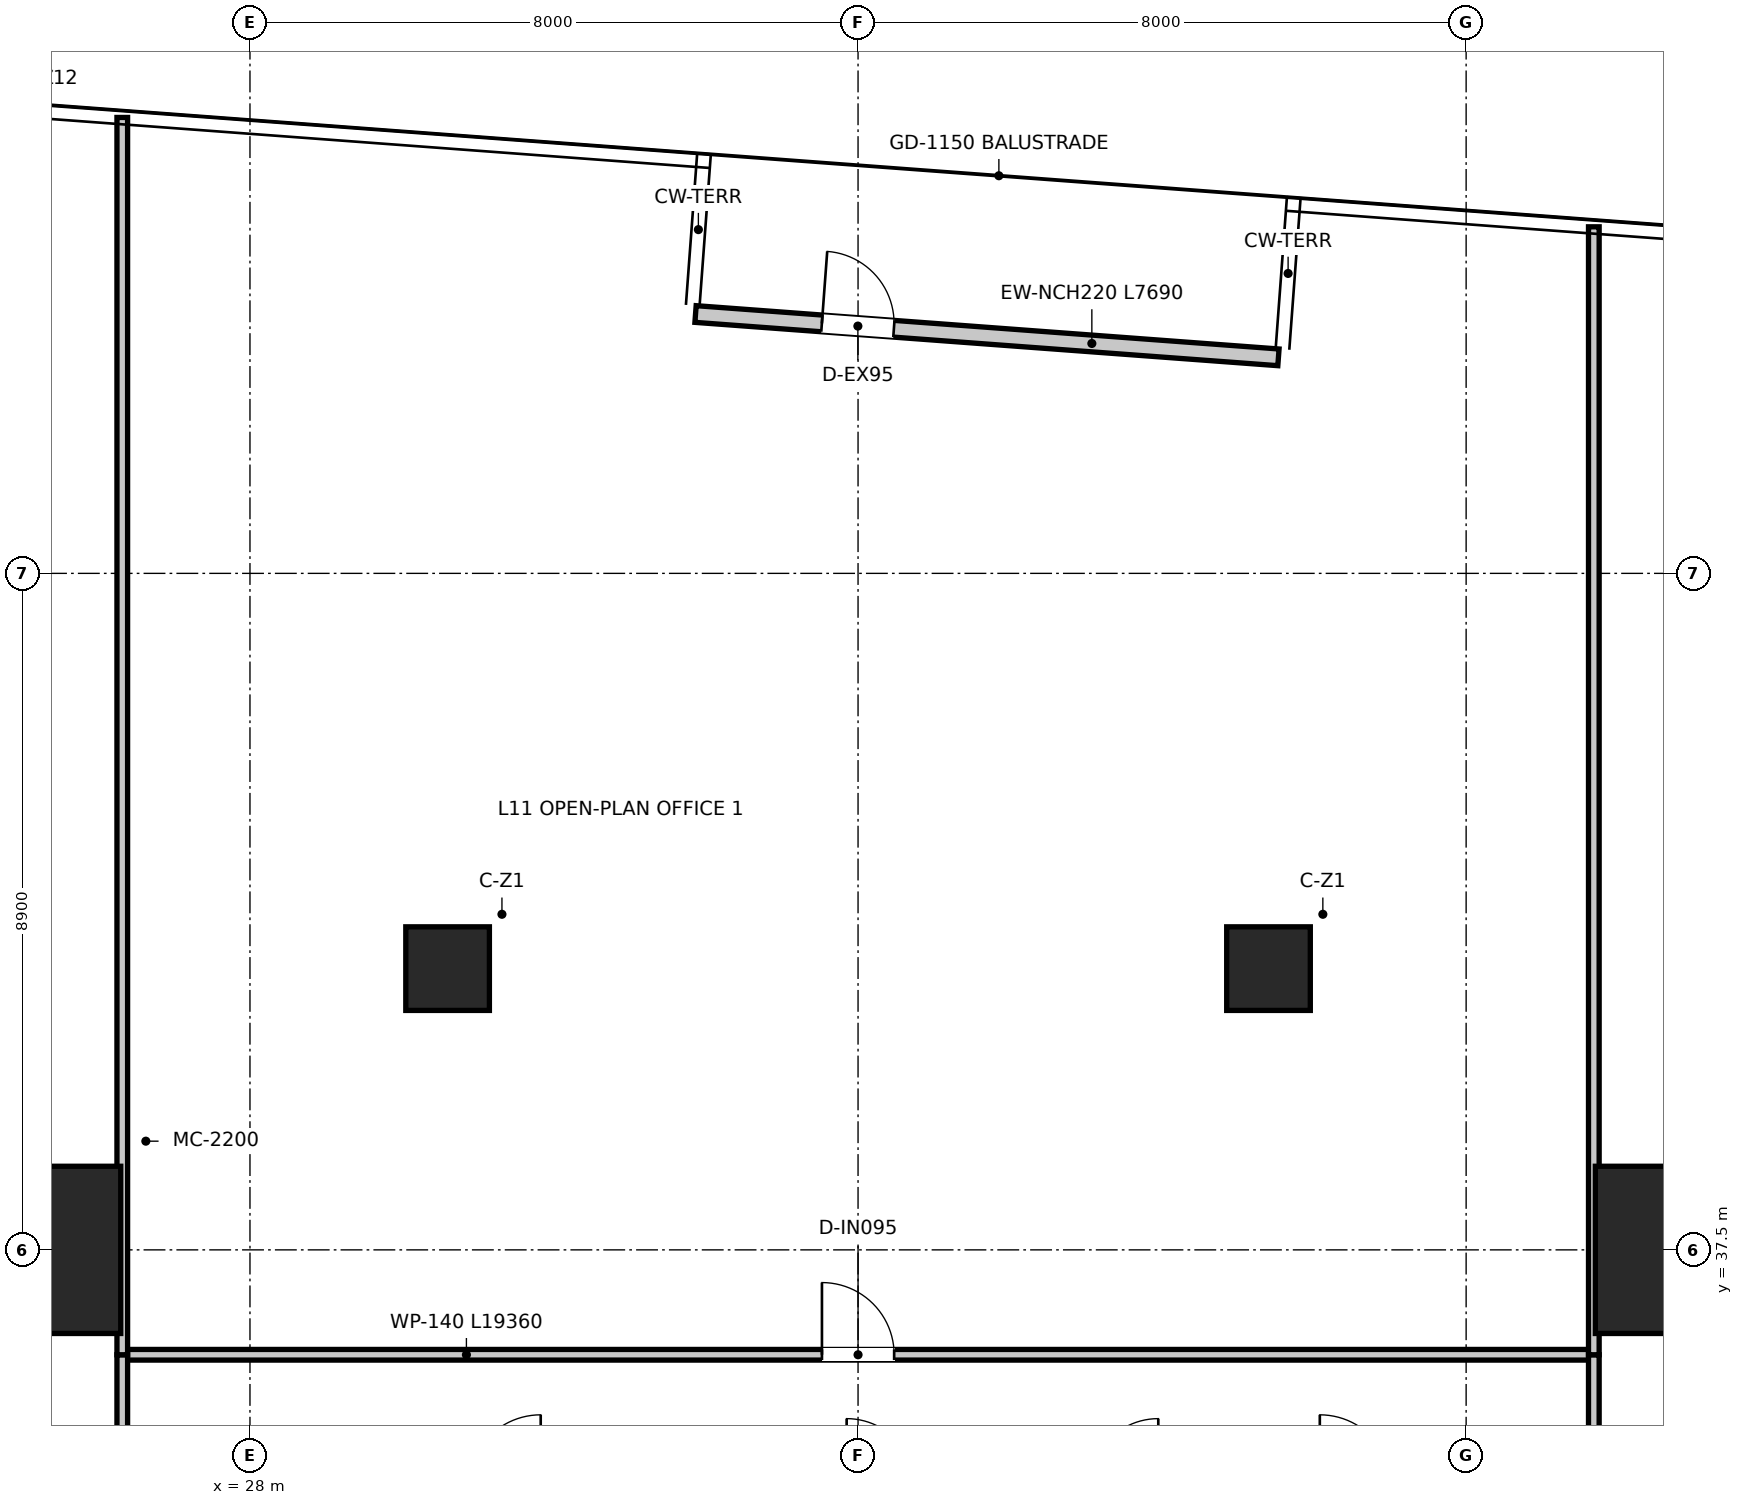
"""IFC4 building model, lengths in metres.
Left out: names, types, materials, properties, quantities, classifications, styles, units other than length and angle.
Written with IfcOpenShell. Run it as: python <this file> out.ifc"""

import sys

from ifc_helpers import new_model, si_unit, direction, frame, frame_2d, origin, origin_2d, place, context, subcontext, project, spatial, rectangle, extrude, source, transform, mapped, element, fill, save


model = new_model("IFC4")
c1 = context("Model", 3, precision=1e-05, world=origin(), true_north=direction((0.0, 1.0)))
c2 = subcontext(c1, "Body", "Model", "MODEL_VIEW")
j1 = project(units=[si_unit("LENGTHUNIT", "METRE"), si_unit("PLANEANGLEUNIT", "RADIAN")], contexts=[c1])
p1 = place(None, origin())
s1 = spatial("IfcSite", under=j1, at=p1, CompositionType="ELEMENT")
p2 = place(p1, origin())
s2 = spatial("IfcBuilding", under=s1, at=p2, CompositionType="ELEMENT")
p3 = place(p2, frame((0.0, 0.0, 48.7)))
s3 = spatial("IfcBuildingStorey", under=s2, at=p3, CompositionType="ELEMENT", Elevation=48.7)
m1 = source(origin(), c2, "Body", "SweptSolid", [
    extrude(rectangle(XDim=2.2, YDim=2.2, at=origin_2d()), origin(), (0.0, 0.0, 1.0), 3.95),
])
for number, where, z_axis, x_axis in (
    (1, (46.8, 37.5, 0.0), (0.0, 0.0, 1.0), (1.0, 0.0, 0.0)),
    (2, (25.2, 37.5, 0.0), (0.0, 0.0, 1.0), (1.0, 0.0, 0.0)),
):
    element("IfcColumn", number, at=place(p3, frame(where, z_axis=z_axis, x_axis=x_axis)), inside=s3, PredefinedType="USERDEFINED", context=c2, shape_type="MappedRepresentation", body=[
        mapped(m1, transform((0.0, 0.0, 0.0), x_axis=(1.0, 0.0, 0.0), y_axis=(0.0, 1.0, 0.0), z_axis=(0.0, 0.0, 1.0), scale=1.0)),
    ])
m2 = source(origin(), c2, "Body", "SweptSolid", [
    extrude(rectangle(XDim=1.1, YDim=1.1, at=origin_2d()), origin(), (0.0, 0.0, 1.0), 3.95),
])
for number, where, z_axis, x_axis in (
    (3, (30.6, 41.2, 0.0), (0.0, 0.0, 1.0), (1.0, 0.0, 0.0)),
    (4, (41.4, 41.2, 0.0), (0.0, 0.0, 1.0), (1.0, 0.0, 0.0)),
):
    element("IfcColumn", number, at=place(p3, frame(where, z_axis=z_axis, x_axis=x_axis)), inside=s3, PredefinedType="COLUMN", context=c2, shape_type="MappedRepresentation", body=[
        mapped(m2, transform((0.0, 0.0, 0.0), x_axis=(1.0, 0.0, 0.0), y_axis=(0.0, 1.0, 0.0), z_axis=(0.0, 0.0, 1.0), scale=1.0)),
    ])
p4 = place(p3, frame((33.862, 49.812, 0.0), z_axis=(0.0, 0.0, 1.0), x_axis=(0.997250923726, -0.074098550107, 0.0)))
e5 = element("IfcWall", 5, at=p4, inside=s3, PredefinedType="ELEMENTEDWALL", context=c2, shape_type="SweptSolid", body=[
    extrude(rectangle(XDim=7.69, YDim=0.22, at=frame_2d((3.845, 0.0))), origin(), (0.0, 0.0, 1.0), 3.67),
])
p5 = place(p4, frame((1.667, 0.0, 0.0)))
e6 = element("IfcOpeningElement", 6, at=p5, cuts=e5, PredefinedType="OPENING", context=c2, shape_type="SweptSolid", body=[
    extrude(rectangle(XDim=0.95, YDim=2.1, at=frame_2d((0.475, 1.05))), frame((0.0, 0.12, 0.0), z_axis=(0.0, -1.0, 0.0), x_axis=(1.0, 0.0, 0.0)), (0.0, 0.0, 1.0), 0.24),
])
p6 = place(p3, frame((26.32, 36.12, 0.0), z_axis=(0.0, 0.0, 1.0), x_axis=(1.0, 0.0, 0.0)))
e7 = element("IfcWall", 7, at=p6, inside=s3, PredefinedType="PARTITIONING", context=c2, shape_type="SweptSolid", body=[
    extrude(rectangle(XDim=19.36, YDim=0.14, at=frame_2d((9.68, 0.0))), origin(), (0.0, 0.0, 1.0), 3.08),
])
p7 = place(p6, frame((9.205, 0.0, 0.0)))
e8 = element("IfcOpeningElement", 8, at=p7, cuts=e7, PredefinedType="OPENING", context=c2, shape_type="SweptSolid", body=[
    extrude(rectangle(XDim=0.95, YDim=2.1, at=frame_2d((0.475, 1.05))), frame((0.0, 0.08, 0.0), z_axis=(0.0, -1.0, 0.0), x_axis=(1.0, 0.0, 0.0)), (0.0, 0.0, 1.0), 0.16),
])
p8 = place(p3, frame((26.32, 10.5, 0.0), z_axis=(0.0, 0.0, 1.0), x_axis=(0.0, 1.0, 0.0)))
e9 = element("IfcWall", 9, at=p8, inside=s3, PredefinedType="PARTITIONING", context=c2, shape_type="SweptSolid", body=[
    extrude(rectangle(XDim=25.62, YDim=0.14, at=frame_2d((12.81, 0.0))), origin(), (0.0, 0.0, 1.0), 2.97),
])
p9 = place(p8, frame((7.675, 0.0, 0.0)))
e10 = element("IfcOpeningElement", 10, at=p9, cuts=e9, PredefinedType="OPENING", context=c2, shape_type="SweptSolid", body=[
    extrude(rectangle(XDim=0.95, YDim=2.1, at=frame_2d((0.475, 1.05))), frame((0.0, 0.08, 0.0), z_axis=(0.0, -1.0, 0.0), x_axis=(1.0, 0.0, 0.0)), (0.0, 0.0, 1.0), 0.16),
])
p10 = place(p8, frame((10.525, 0.0, 0.0)))
e11 = element("IfcOpeningElement", 11, at=p10, cuts=e9, PredefinedType="OPENING", context=c2, shape_type="SweptSolid", body=[
    extrude(rectangle(XDim=0.95, YDim=2.1, at=frame_2d((0.475, 1.05))), frame((0.0, 0.08, 0.0), z_axis=(0.0, -1.0, 0.0), x_axis=(1.0, 0.0, 0.0)), (0.0, 0.0, 1.0), 0.16),
])
p11 = place(p8, frame((13.925, 0.0, 0.0)))
e12 = element("IfcOpeningElement", 12, at=p11, cuts=e9, PredefinedType="OPENING", context=c2, shape_type="SweptSolid", body=[
    extrude(rectangle(XDim=0.95, YDim=2.1, at=frame_2d((0.475, 1.05))), frame((0.0, 0.08, 0.0), z_axis=(0.0, -1.0, 0.0), x_axis=(1.0, 0.0, 0.0)), (0.0, 0.0, 1.0), 0.16),
])
p12 = place(p8, frame((17.325, 0.0, 0.0)))
e13 = element("IfcOpeningElement", 13, at=p12, cuts=e9, PredefinedType="OPENING", context=c2, shape_type="SweptSolid", body=[
    extrude(rectangle(XDim=0.95, YDim=2.1, at=frame_2d((0.475, 1.05))), frame((0.0, 0.08, 0.0), z_axis=(0.0, -1.0, 0.0), x_axis=(1.0, 0.0, 0.0)), (0.0, 0.0, 1.0), 0.16),
])
p13 = place(p8, frame((20.725, 0.0, 0.0)))
e14 = element("IfcOpeningElement", 14, at=p13, cuts=e9, PredefinedType="OPENING", context=c2, shape_type="SweptSolid", body=[
    extrude(rectangle(XDim=0.95, YDim=2.1, at=frame_2d((0.475, 1.05))), frame((0.0, 0.08, 0.0), z_axis=(0.0, -1.0, 0.0), x_axis=(1.0, 0.0, 0.0)), (0.0, 0.0, 1.0), 0.16),
])
p14 = place(p8, frame((23.075, 0.0, 0.0)))
e15 = element("IfcOpeningElement", 15, at=p14, cuts=e9, PredefinedType="OPENING", context=c2, shape_type="SweptSolid", body=[
    extrude(rectangle(XDim=0.95, YDim=2.1, at=frame_2d((0.475, 1.05))), frame((0.0, 0.08, 0.0), z_axis=(0.0, -1.0, 0.0), x_axis=(1.0, 0.0, 0.0)), (0.0, 0.0, 1.0), 0.16),
])
p15 = place(p3, frame((45.68, 10.5, 0.0), z_axis=(0.0, 0.0, 1.0), x_axis=(0.0, 1.0, 0.0)))
e16 = element("IfcWall", 16, at=p15, inside=s3, PredefinedType="PARTITIONING", context=c2, shape_type="SweptSolid", body=[
    extrude(rectangle(XDim=25.62, YDim=0.14, at=frame_2d((12.81, 0.0))), origin(), (0.0, 0.0, 1.0), 2.97),
])
p16 = place(p15, frame((7.675, 0.0, 0.0)))
e17 = element("IfcOpeningElement", 17, at=p16, cuts=e16, PredefinedType="OPENING", context=c2, shape_type="SweptSolid", body=[
    extrude(rectangle(XDim=0.95, YDim=2.1, at=frame_2d((0.475, 1.05))), frame((0.0, 0.08, 0.0), z_axis=(0.0, -1.0, 0.0), x_axis=(1.0, 0.0, 0.0)), (0.0, 0.0, 1.0), 0.16),
])
p17 = place(p15, frame((10.525, 0.0, 0.0)))
e18 = element("IfcOpeningElement", 18, at=p17, cuts=e16, PredefinedType="OPENING", context=c2, shape_type="SweptSolid", body=[
    extrude(rectangle(XDim=0.95, YDim=2.1, at=frame_2d((0.475, 1.05))), frame((0.0, 0.08, 0.0), z_axis=(0.0, -1.0, 0.0), x_axis=(1.0, 0.0, 0.0)), (0.0, 0.0, 1.0), 0.16),
])
p18 = place(p15, frame((13.925, 0.0, 0.0)))
e19 = element("IfcOpeningElement", 19, at=p18, cuts=e16, PredefinedType="OPENING", context=c2, shape_type="SweptSolid", body=[
    extrude(rectangle(XDim=0.95, YDim=2.1, at=frame_2d((0.475, 1.05))), frame((0.0, 0.08, 0.0), z_axis=(0.0, -1.0, 0.0), x_axis=(1.0, 0.0, 0.0)), (0.0, 0.0, 1.0), 0.16),
])
p19 = place(p15, frame((17.325, 0.0, 0.0)))
e20 = element("IfcOpeningElement", 20, at=p19, cuts=e16, PredefinedType="OPENING", context=c2, shape_type="SweptSolid", body=[
    extrude(rectangle(XDim=0.95, YDim=2.1, at=frame_2d((0.475, 1.05))), frame((0.0, 0.08, 0.0), z_axis=(0.0, -1.0, 0.0), x_axis=(1.0, 0.0, 0.0)), (0.0, 0.0, 1.0), 0.16),
])
p20 = place(p15, frame((20.725, 0.0, 0.0)))
e21 = element("IfcOpeningElement", 21, at=p20, cuts=e16, PredefinedType="OPENING", context=c2, shape_type="SweptSolid", body=[
    extrude(rectangle(XDim=0.95, YDim=2.1, at=frame_2d((0.475, 1.05))), frame((0.0, 0.08, 0.0), z_axis=(0.0, -1.0, 0.0), x_axis=(1.0, 0.0, 0.0)), (0.0, 0.0, 1.0), 0.16),
])
p21 = place(p15, frame((23.075, 0.0, 0.0)))
e22 = element("IfcOpeningElement", 22, at=p21, cuts=e16, PredefinedType="OPENING", context=c2, shape_type="SweptSolid", body=[
    extrude(rectangle(XDim=0.95, YDim=2.1, at=frame_2d((0.475, 1.05))), frame((0.0, 0.08, 0.0), z_axis=(0.0, -1.0, 0.0), x_axis=(1.0, 0.0, 0.0)), (0.0, 0.0, 1.0), 0.16),
])
p22 = place(p3, frame((26.32, 36.12, 0.0), z_axis=(0.0, 0.0, 1.0), x_axis=(0.0, 1.0, 0.0)))
e23 = element("IfcWall", 23, at=p22, inside=s3, PredefinedType="PARTITIONING", context=c2, shape_type="SweptSolid", body=[
    extrude(rectangle(XDim=16.278, YDim=0.14, at=frame_2d((8.139, 0.0))), origin(), (0.0, 0.0, 1.0), 2.97),
])
p23 = place(p3, frame((45.68, 36.12, 0.0), z_axis=(0.0, 0.0, 1.0), x_axis=(0.0, 1.0, 0.0)))
e24 = element("IfcWall", 24, at=p23, inside=s3, PredefinedType="PARTITIONING", context=c2, shape_type="SweptSolid", body=[
    extrude(rectangle(XDim=14.839, YDim=0.14, at=frame_2d((7.419, 0.0))), origin(), (0.0, 0.0, 1.0), 2.97),
])
p24 = place(p7, origin())
e25 = element("IfcDoor", 25, at=p24, inside=s3, OperationType="SINGLE_SWING_LEFT", PredefinedType="DOOR", context=c2, shape_type="SweptSolid", body=[
    extrude(rectangle(XDim=0.95, YDim=2.1, at=frame_2d((0.475, 1.05))), frame((0.0, 0.025, 0.0), z_axis=(0.0, -1.0, 0.0), x_axis=(1.0, 0.0, 0.0)), (0.0, 0.0, 1.0), 0.05),
])
fill(e8, e25)
p25 = place(p5, origin())
e26 = element("IfcDoor", 26, at=p25, inside=s3, OperationType="SINGLE_SWING_LEFT", PredefinedType="DOOR", context=c2, shape_type="SweptSolid", body=[
    extrude(rectangle(XDim=0.95, YDim=2.1, at=frame_2d((0.475, 1.05))), frame((0.0, 0.025, 0.0), z_axis=(0.0, -1.0, 0.0), x_axis=(1.0, 0.0, 0.0)), (0.0, 0.0, 1.0), 0.05),
])
fill(e6, e26)
save(model, sys.argv[1])
